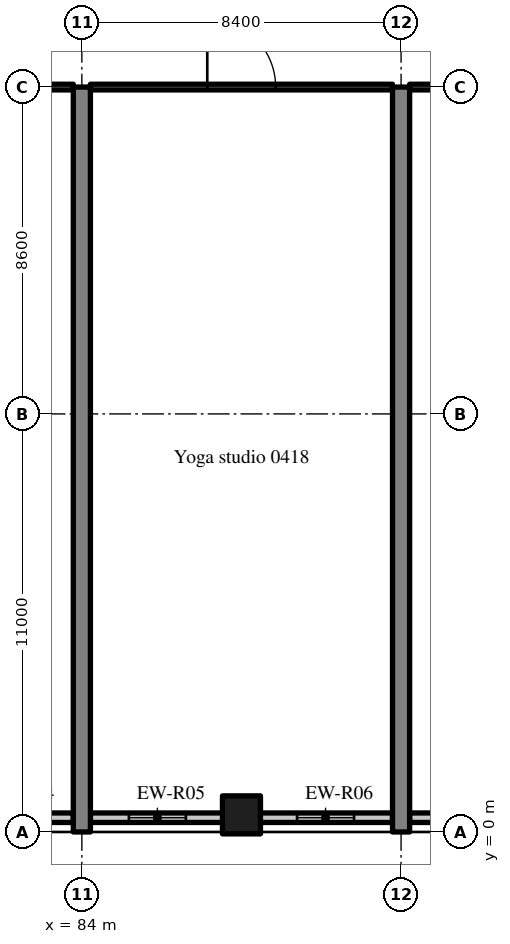
"""IFC4 building model, lengths in metres.
Left out: names, types, materials, properties, quantities, classifications, styles, units other than length and angle.
Written with IfcOpenShell. Run it as: python <this file> out.ifc"""

import sys

from ifc_helpers import new_model, si_unit, direction, frame, frame_2d, origin, origin_2d, place, context, subcontext, project, spatial, rectangle, extrude, source, transform, mapped, element, fill, save


model = new_model("IFC4")
c1 = context("Model", 3, precision=1e-05, world=origin(), true_north=direction((0.0, 1.0)))
c2 = subcontext(c1, "Body", "Model", "MODEL_VIEW")
j1 = project(units=[si_unit("LENGTHUNIT", "METRE"), si_unit("PLANEANGLEUNIT", "RADIAN")], contexts=[c1])
p1 = place(None, origin())
s1 = spatial("IfcSite", under=j1, at=p1, CompositionType="ELEMENT")
p2 = place(p1, origin())
s2 = spatial("IfcBuilding", under=s1, at=p2, CompositionType="ELEMENT")
p3 = place(p2, frame((0.0, 0.0, 23.0)))
s3 = spatial("IfcBuildingStorey", under=s2, at=p3, CompositionType="ELEMENT", Elevation=23.0)
m1 = source(origin(), c2, "Body", "SweptSolid", [
    extrude(rectangle(XDim=19.6, YDim=0.45, at=frame_2d((9.8, 0.0))), origin(), (0.0, 0.0, 1.0), 4.52),
])
for number, where, z_axis, x_axis in (
    (1, (84.0, 0.0, 0.0), (0.0, 0.0, 1.0), (0.0, 1.0, 0.0)),
    (2, (92.4, 0.0, 0.0), (0.0, 0.0, 1.0), (0.0, 1.0, 0.0)),
):
    element("IfcWall", number, at=place(p3, frame(where, z_axis=z_axis, x_axis=x_axis)), inside=s3, PredefinedType="SHEAR", context=c2, shape_type="MappedRepresentation", body=[
        mapped(m1, transform((0.0, 0.0, 0.0), scale=1.0)),
    ])
m2 = source(origin(), c2, "Body", "SweptSolid", [
    extrude(rectangle(XDim=1.0, YDim=1.0, at=origin_2d()), origin(), (0.0, 0.0, 1.0), 4.52),
])
p4 = place(p3, frame((88.2, 0.45, 0.0), z_axis=(0.0, 0.0, 1.0), x_axis=(1.0, 0.0, 0.0)))
e3 = element("IfcColumn", 3, at=p4, inside=s3, PredefinedType="COLUMN", context=c2, shape_type="MappedRepresentation", body=[
    mapped(m2, transform((0.0, 0.0, 0.0), scale=1.0)),
])
m3 = source(origin(), c2, "Body", "SweptSolid", [
    extrude(rectangle(XDim=3.525, YDim=0.25, at=frame_2d((1.762, 0.0))), origin(), (0.0, 0.0, 1.0), 3.77),
])
p5 = place(p3, frame((80.25, 0.375, 0.0), z_axis=(0.0, 0.0, 1.0), x_axis=(1.0, 0.0, 0.0)))
e4 = element("IfcWall", 4, at=p5, inside=s3, PredefinedType="SOLIDWALL", context=c2, shape_type="MappedRepresentation", body=[
    mapped(m3, transform((0.0, 0.0, 0.0), scale=1.0)),
])
m4 = source(origin(), c2, "Body", "SweptSolid", [
    extrude(rectangle(XDim=1.5, YDim=1.5, at=frame_2d((0.75, 0.75))), frame((0.0, 0.135, 0.0), z_axis=(0.0, -1.0, 0.0), x_axis=(1.0, 0.0, 0.0)), (0.0, 0.0, 1.0), 0.27),
])
p6 = place(p5, frame((1.012, 0.0, 0.9)))
e5 = element("IfcOpeningElement", 5, at=p6, cuts=e4, PredefinedType="OPENING", context=c2, shape_type="MappedRepresentation", body=[
    mapped(m4, transform((0.0, 0.0, 0.0), scale=1.0)),
])
p7 = place(p3, frame((84.225, 0.375, 0.0), z_axis=(0.0, 0.0, 1.0), x_axis=(1.0, 0.0, 0.0)))
e6 = element("IfcWall", 6, at=p7, inside=s3, PredefinedType="SOLIDWALL", context=c2, shape_type="MappedRepresentation", body=[
    mapped(m3, transform((0.0, 0.0, 0.0), scale=1.0)),
])
p8 = place(p7, frame((1.012, 0.0, 0.9)))
e7 = element("IfcOpeningElement", 7, at=p8, cuts=e6, PredefinedType="OPENING", context=c2, shape_type="MappedRepresentation", body=[
    mapped(m4, transform((0.0, 0.0, 0.0), scale=1.0)),
])
m5 = source(origin(), c2, "Body", "SweptSolid", [
    extrude(rectangle(XDim=3.525, YDim=0.25, at=frame_2d((1.763, 0.0))), origin(), (0.0, 0.0, 1.0), 3.77),
])
p9 = place(p3, frame((88.65, 0.375, 0.0), z_axis=(0.0, 0.0, 1.0), x_axis=(1.0, 0.0, 0.0)))
e8 = element("IfcWall", 8, at=p9, inside=s3, PredefinedType="SOLIDWALL", context=c2, shape_type="MappedRepresentation", body=[
    mapped(m5, transform((0.0, 0.0, 0.0), scale=1.0)),
])
p10 = place(p9, frame((1.012, 0.0, 0.9)))
e9 = element("IfcOpeningElement", 9, at=p10, cuts=e8, PredefinedType="OPENING", context=c2, shape_type="MappedRepresentation", body=[
    mapped(m4, transform((0.0, 0.0, 0.0), scale=1.0)),
])
m6 = source(origin(), c2, "Body", "SweptSolid", [
    extrude(rectangle(XDim=3.9, YDim=0.25, at=frame_2d((1.95, 0.0))), origin(), (0.0, 0.0, 1.0), 3.77),
])
p11 = place(p3, frame((92.625, 0.375, 0.0), z_axis=(0.0, 0.0, 1.0), x_axis=(1.0, 0.0, 0.0)))
e10 = element("IfcWall", 10, at=p11, inside=s3, PredefinedType="SOLIDWALL", context=c2, shape_type="MappedRepresentation", body=[
    mapped(m6, transform((0.0, 0.0, 0.0), scale=1.0)),
])
p12 = place(p11, frame((1.26, 0.0, 0.9)))
e11 = element("IfcOpeningElement", 11, at=p12, cuts=e10, PredefinedType="OPENING", context=c2, shape_type="MappedRepresentation", body=[
    mapped(m4, transform((0.0, 0.0, 0.0), scale=1.0)),
])
m7 = source(origin(), c2, "Body", "SweptSolid", [
    extrude(rectangle(XDim=7.95, YDim=0.15, at=frame_2d((3.975, 0.0))), origin(), (0.0, 0.0, 1.0), 3.82),
])
p13 = place(p3, frame((75.825, 19.6, 0.0), z_axis=(0.0, 0.0, 1.0), x_axis=(1.0, 0.0, 0.0)))
e12 = element("IfcWall", 12, at=p13, inside=s3, PredefinedType="PARTITIONING", context=c2, shape_type="MappedRepresentation", body=[
    mapped(m7, transform((0.0, 0.0, 0.0), scale=1.0)),
])
m8 = source(origin(), c2, "Body", "SweptSolid", [
    extrude(rectangle(XDim=1.8, YDim=2.1, at=frame_2d((0.9, 1.05))), frame((0.0, 0.085, 0.0), z_axis=(0.0, -1.0, 0.0), x_axis=(1.0, 0.0, 0.0)), (0.0, 0.0, 1.0), 0.17),
])
p14 = place(p13, frame((3.075, 0.0, 0.0)))
e13 = element("IfcOpeningElement", 13, at=p14, cuts=e12, PredefinedType="OPENING", context=c2, shape_type="MappedRepresentation", body=[
    mapped(m8, transform((0.0, 0.0, 0.0), scale=1.0)),
])
p15 = place(p3, frame((84.225, 19.6, 0.0), z_axis=(0.0, 0.0, 1.0), x_axis=(1.0, 0.0, 0.0)))
e14 = element("IfcWall", 14, at=p15, inside=s3, PredefinedType="PARTITIONING", context=c2, shape_type="MappedRepresentation", body=[
    mapped(m7, transform((0.0, 0.0, 0.0), scale=1.0)),
])
p16 = place(p15, frame((3.075, 0.0, 0.0)))
e15 = element("IfcOpeningElement", 15, at=p16, cuts=e14, PredefinedType="OPENING", context=c2, shape_type="MappedRepresentation", body=[
    mapped(m8, transform((0.0, 0.0, 0.0), scale=1.0)),
])
m9 = source(origin(), c2, "Body", "SweptSolid", [
    extrude(rectangle(XDim=7.675, YDim=0.15, at=frame_2d((3.837, 0.0))), origin(), (0.0, 0.0, 1.0), 3.82),
])
p17 = place(p3, frame((92.625, 19.6, 0.0), z_axis=(0.0, 0.0, 1.0), x_axis=(1.0, 0.0, 0.0)))
e16 = element("IfcWall", 16, at=p17, inside=s3, PredefinedType="PARTITIONING", context=c2, shape_type="MappedRepresentation", body=[
    mapped(m9, transform((0.0, 0.0, 0.0), scale=1.0)),
])
p18 = place(p17, frame((2.962, 0.0, 0.0)))
e17 = element("IfcOpeningElement", 17, at=p18, cuts=e16, PredefinedType="OPENING", context=c2, shape_type="MappedRepresentation", body=[
    mapped(m8, transform((0.0, 0.0, 0.0), scale=1.0)),
])
m10 = source(origin(), c2, "Body", "SweptSolid", [
    extrude(rectangle(XDim=1.5, YDim=1.5, at=frame_2d((0.75, 0.75))), frame((0.0, 0.03, 0.0), z_axis=(0.0, -1.0, 0.0), x_axis=(1.0, 0.0, 0.0)), (0.0, 0.0, 1.0), 0.06),
])
p19 = place(p8, origin())
e18 = element("IfcWindow", 18, at=p19, inside=s3, PartitioningType="SINGLE_PANEL", PredefinedType="WINDOW", context=c2, shape_type="MappedRepresentation", body=[
    mapped(m10, transform((0.0, 0.0, 0.0), scale=1.0)),
])
fill(e7, e18)
p20 = place(p10, origin())
e19 = element("IfcWindow", 19, at=p20, inside=s3, PartitioningType="SINGLE_PANEL", PredefinedType="WINDOW", context=c2, shape_type="MappedRepresentation", body=[
    mapped(m10, transform((0.0, 0.0, 0.0), scale=1.0)),
])
fill(e9, e19)
m11 = source(origin(), c2, "Body", "SweptSolid", [
    extrude(rectangle(XDim=1.8, YDim=2.1, at=frame_2d((0.9, 1.05))), frame((0.0, 0.025, 0.0), z_axis=(0.0, -1.0, 0.0), x_axis=(1.0, 0.0, 0.0)), (0.0, 0.0, 1.0), 0.05),
])
p21 = place(p16, origin())
e20 = element("IfcDoor", 20, at=p21, inside=s3, OperationType="DOUBLE_DOOR_SINGLE_SWING", PredefinedType="DOOR", context=c2, shape_type="MappedRepresentation", body=[
    mapped(m11, transform((0.0, 0.0, 0.0), scale=1.0)),
])
fill(e15, e20)
save(model, sys.argv[1])
